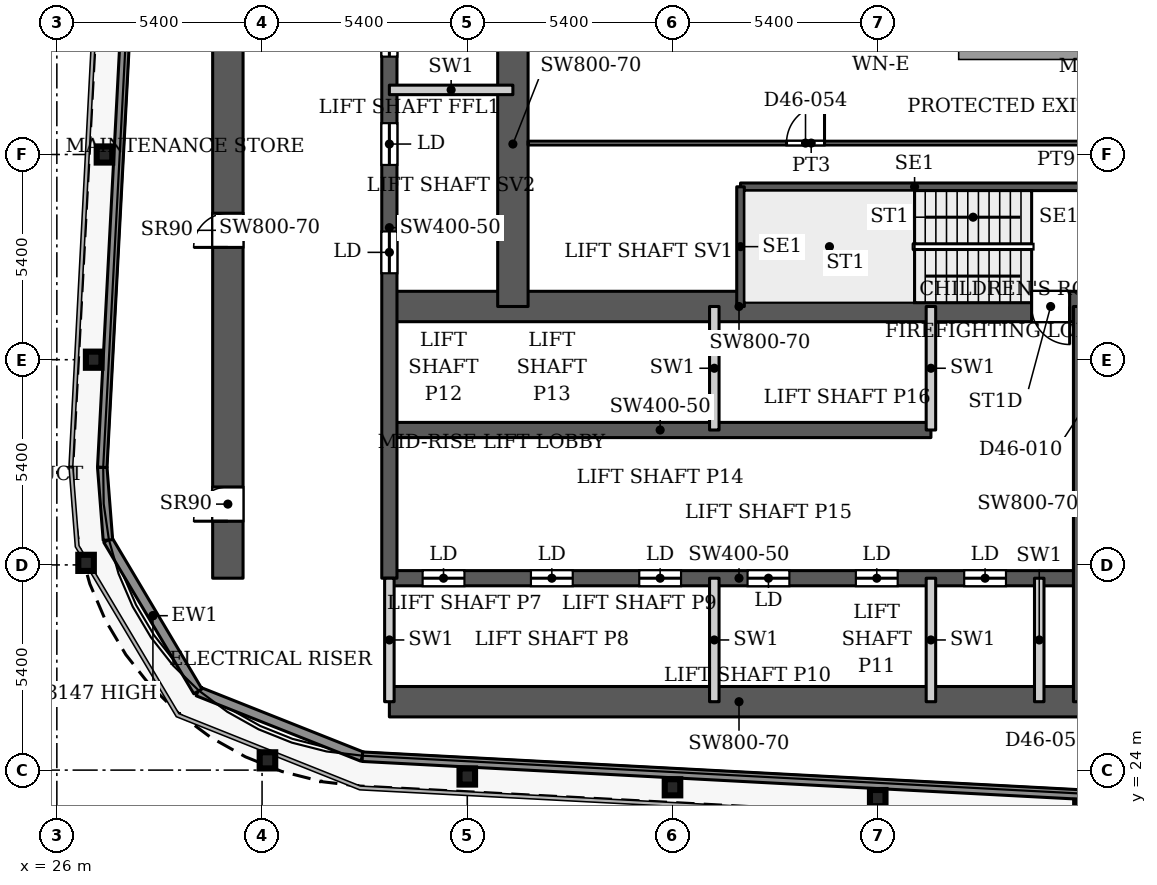
"""IFC4 building model, lengths in metres.
Left out: names, types, materials, properties, quantities, classifications, styles, units other than length and angle.
Written with IfcOpenShell. Run it as: python <this file> out.ifc"""

import sys

from ifc_helpers import new_model, si_unit, direction, frame, frame_2d, origin, origin_2d, place, context, subcontext, project, spatial, rectangle, i_section, extrude, source, transform, mapped, element, fill, save


model = new_model("IFC4")
c1 = context("Model", 3, precision=1e-05, world=origin(), true_north=direction((0.0, 1.0)))
c2 = subcontext(c1, "Body", "Model", "MODEL_VIEW")
j1 = project(units=[si_unit("LENGTHUNIT", "METRE"), si_unit("PLANEANGLEUNIT", "RADIAN")], contexts=[c1])
p1 = place(None, origin())
s1 = spatial("IfcSite", under=j1, at=p1, CompositionType="ELEMENT")
p2 = place(p1, origin())
s2 = spatial("IfcBuilding", under=s1, at=p2, CompositionType="ELEMENT")
p3 = place(p2, frame((0.0, 0.0, 195.5)))
s3 = spatial("IfcBuildingStorey", under=s2, at=p3, CompositionType="ELEMENT", Elevation=195.5)
for number, where, z_axis, x_axis in (
    (1, (53.0, 22.98, 0.0), (0.0, 0.0, 1.0), (1.0, 0.0, 0.0)),
    (2, (47.6, 23.264, 0.0), (0.0, 0.0, 1.0), (1.0, 0.0, 0.0)),
    (3, (42.2, 23.548, 0.0), (0.0, 0.0, 1.0), (1.0, 0.0, 0.0)),
    (4, (36.8, 23.832, 0.0), (0.0, 0.0, 1.0), (1.0, 0.0, 0.0)),
    (5, (31.542, 24.257, 0.0), (0.0, 0.0, 1.0), (1.0, 0.0, 0.0)),
    (6, (26.769, 29.454, 0.0), (0.0, 0.0, 1.0), (1.0, 0.0, 0.0)),
    (7, (26.969, 34.8, 0.0), (0.0, 0.0, 1.0), (1.0, 0.0, 0.0)),
    (8, (27.253, 40.2, 0.0), (0.0, 0.0, 1.0), (1.0, 0.0, 0.0)),
):
    element("IfcColumn", number, at=place(p3, frame(where, z_axis=z_axis, x_axis=x_axis)), inside=s3, PredefinedType="COLUMN", context=c2, shape_type="SweptSolid", body=[
        extrude(i_section(OverallWidth=0.409, OverallDepth=0.425, WebThickness=0.033, FlangeThickness=0.052, FilletRadius=0.013, at=origin_2d()), origin(), (0.0, 0.0, 1.0), 3.9),
    ])
p4 = place(p3, frame((34.75, 25.8, 0.0), z_axis=(0.0, 0.0, 1.0), x_axis=(1.0, 0.0, 0.0)))
e9 = element("IfcWall", 9, at=p4, inside=s3, PredefinedType="SHEAR", context=c2, shape_type="SweptSolid", body=[
    extrude(rectangle(XDim=18.4, YDim=0.8, at=frame_2d((9.2, 0.0))), origin(), (0.0, 0.0, 1.0), 3.9),
])
p5 = place(p3, frame((34.75, 29.05, 0.0), z_axis=(0.0, 0.0, 1.0), x_axis=(1.0, 0.0, 0.0)))
e10 = element("IfcWall", 10, at=p5, inside=s3, PredefinedType="SHEAR", context=c2, shape_type="SweptSolid", body=[
    extrude(rectangle(XDim=18.4, YDim=0.4, at=frame_2d((9.2, 0.0))), origin(), (0.0, 0.0, 1.0), 3.9),
])
p6 = place(p5, frame((0.875, 0.0, 0.0)))
e11 = element("IfcOpeningElement", 11, at=p6, cuts=e10, PredefinedType="OPENING", context=c2, shape_type="SweptSolid", body=[
    extrude(rectangle(XDim=1.1, YDim=2.2, at=frame_2d((0.55, 1.1))), frame((0.0, 0.21, 0.0), z_axis=(0.0, -1.0, 0.0), x_axis=(1.0, 0.0, 0.0)), (0.0, 0.0, 1.0), 0.42),
])
p7 = place(p5, frame((3.725, 0.0, 0.0)))
e12 = element("IfcOpeningElement", 12, at=p7, cuts=e10, PredefinedType="OPENING", context=c2, shape_type="SweptSolid", body=[
    extrude(rectangle(XDim=1.1, YDim=2.2, at=frame_2d((0.55, 1.1))), frame((0.0, 0.21, 0.0), z_axis=(0.0, -1.0, 0.0), x_axis=(1.0, 0.0, 0.0)), (0.0, 0.0, 1.0), 0.42),
])
p8 = place(p5, frame((6.575, 0.0, 0.0)))
e13 = element("IfcOpeningElement", 13, at=p8, cuts=e10, PredefinedType="OPENING", context=c2, shape_type="SweptSolid", body=[
    extrude(rectangle(XDim=1.1, YDim=2.2, at=frame_2d((0.55, 1.1))), frame((0.0, 0.21, 0.0), z_axis=(0.0, -1.0, 0.0), x_axis=(1.0, 0.0, 0.0)), (0.0, 0.0, 1.0), 0.42),
])
p9 = place(p5, frame((9.425, 0.0, 0.0)))
e14 = element("IfcOpeningElement", 14, at=p9, cuts=e10, PredefinedType="OPENING", context=c2, shape_type="SweptSolid", body=[
    extrude(rectangle(XDim=1.1, YDim=2.2, at=frame_2d((0.55, 1.1))), frame((0.0, 0.21, 0.0), z_axis=(0.0, -1.0, 0.0), x_axis=(1.0, 0.0, 0.0)), (0.0, 0.0, 1.0), 0.42),
])
p10 = place(p5, frame((12.275, 0.0, 0.0)))
e15 = element("IfcOpeningElement", 15, at=p10, cuts=e10, PredefinedType="OPENING", context=c2, shape_type="SweptSolid", body=[
    extrude(rectangle(XDim=1.1, YDim=2.2, at=frame_2d((0.55, 1.1))), frame((0.0, 0.21, 0.0), z_axis=(0.0, -1.0, 0.0), x_axis=(1.0, 0.0, 0.0)), (0.0, 0.0, 1.0), 0.42),
])
p11 = place(p5, frame((15.125, 0.0, 0.0)))
e16 = element("IfcOpeningElement", 16, at=p11, cuts=e10, PredefinedType="OPENING", context=c2, shape_type="SweptSolid", body=[
    extrude(rectangle(XDim=1.1, YDim=2.2, at=frame_2d((0.55, 1.1))), frame((0.0, 0.21, 0.0), z_axis=(0.0, -1.0, 0.0), x_axis=(1.0, 0.0, 0.0)), (0.0, 0.0, 1.0), 0.42),
])
p12 = place(p3, frame((34.75, 32.95, 0.0), z_axis=(0.0, 0.0, 1.0), x_axis=(1.0, 0.0, 0.0)))
e17 = element("IfcWall", 17, at=p12, inside=s3, PredefinedType="SHEAR", context=c2, shape_type="SweptSolid", body=[
    extrude(rectangle(XDim=14.25, YDim=0.4, at=frame_2d((7.125, 0.0))), origin(), (0.0, 0.0, 1.0), 3.9),
])
p13 = place(p3, frame((34.75, 36.2, 0.0), z_axis=(0.0, 0.0, 1.0), x_axis=(1.0, 0.0, 0.0)))
e18 = element("IfcWall", 18, at=p13, inside=s3, PredefinedType="SHEAR", context=c2, shape_type="SweptSolid", body=[
    extrude(rectangle(XDim=18.4, YDim=0.8, at=frame_2d((9.2, 0.0))), origin(), (0.0, 0.0, 1.0), 3.9),
])
p14 = place(p13, frame((16.9, 0.0, 0.0)))
e19 = element("IfcOpeningElement", 19, at=p14, cuts=e18, PredefinedType="OPENING", context=c2, shape_type="SweptSolid", body=[
    extrude(rectangle(XDim=1.0, YDim=2.2, at=frame_2d((0.5, 1.1))), frame((0.0, 0.41, 0.0), z_axis=(0.0, -1.0, 0.0), x_axis=(1.0, 0.0, 0.0)), (0.0, 0.0, 1.0), 0.82),
])
p15 = place(p3, frame((34.75, 29.05, 0.0), z_axis=(0.0, 0.0, 1.0), x_axis=(0.0, 1.0, 0.0)))
e20 = element("IfcWall", 20, at=p15, inside=s3, PredefinedType="SHEAR", context=c2, shape_type="SweptSolid", body=[
    extrude(rectangle(XDim=18.45, YDim=0.4, at=frame_2d((9.225, 0.0))), origin(), (0.0, 0.0, 1.0), 3.9),
])
p16 = place(p15, frame((8.025, 0.0, 0.0)))
e21 = element("IfcOpeningElement", 21, at=p16, cuts=e20, PredefinedType="OPENING", context=c2, shape_type="SweptSolid", body=[
    extrude(rectangle(XDim=1.1, YDim=2.2, at=frame_2d((0.55, 1.1))), frame((0.0, 0.21, 0.0), z_axis=(0.0, -1.0, 0.0), x_axis=(1.0, 0.0, 0.0)), (0.0, 0.0, 1.0), 0.42),
])
p17 = place(p15, frame((10.875, 0.0, 0.0)))
e22 = element("IfcOpeningElement", 22, at=p17, cuts=e20, PredefinedType="OPENING", context=c2, shape_type="SweptSolid", body=[
    extrude(rectangle(XDim=1.1, YDim=2.2, at=frame_2d((0.55, 1.1))), frame((0.0, 0.21, 0.0), z_axis=(0.0, -1.0, 0.0), x_axis=(1.0, 0.0, 0.0)), (0.0, 0.0, 1.0), 0.42),
])
p18 = place(p15, frame((13.725, 0.0, 0.0)))
e23 = element("IfcOpeningElement", 23, at=p18, cuts=e20, PredefinedType="OPENING", context=c2, shape_type="SweptSolid", body=[
    extrude(rectangle(XDim=1.1, YDim=2.2, at=frame_2d((0.55, 1.1))), frame((0.0, 0.21, 0.0), z_axis=(0.0, -1.0, 0.0), x_axis=(1.0, 0.0, 0.0)), (0.0, 0.0, 1.0), 0.42),
])
p19 = place(p15, frame((15.95, 0.0, 0.0)))
e24 = element("IfcOpeningElement", 24, at=p19, cuts=e20, PredefinedType="OPENING", context=c2, shape_type="SweptSolid", body=[
    extrude(rectangle(XDim=1.1, YDim=2.2, at=frame_2d((0.55, 1.1))), frame((0.0, 0.21, 0.0), z_axis=(0.0, -1.0, 0.0), x_axis=(1.0, 0.0, 0.0)), (0.0, 0.0, 1.0), 0.42),
])
p20 = place(p3, frame((38.0, 36.2, 0.0), z_axis=(0.0, 0.0, 1.0), x_axis=(0.0, 1.0, 0.0)))
e25 = element("IfcWall", 25, at=p20, inside=s3, PredefinedType="SHEAR", context=c2, shape_type="SweptSolid", body=[
    extrude(rectangle(XDim=8.55, YDim=0.8, at=frame_2d((4.275, 0.0))), origin(), (0.0, 0.0, 1.0), 3.9),
])
p21 = place(p3, frame((30.5, 29.05, 0.0), z_axis=(0.0, 0.0, 1.0), x_axis=(0.0, 1.0, 0.0)))
e26 = element("IfcWall", 26, at=p21, inside=s3, PredefinedType="SHEAR", context=c2, shape_type="SweptSolid", body=[
    extrude(rectangle(XDim=18.45, YDim=0.8, at=frame_2d((9.225, 0.0))), origin(), (0.0, 0.0, 1.0), 3.9),
])
p22 = place(p21, frame((1.5, 0.0, 0.0)))
e27 = element("IfcOpeningElement", 27, at=p22, cuts=e26, PredefinedType="OPENING", context=c2, shape_type="SweptSolid", body=[
    extrude(rectangle(XDim=0.9, YDim=2.2, at=frame_2d((0.45, 1.1))), frame((0.0, 0.41, 0.0), z_axis=(0.0, -1.0, 0.0), x_axis=(1.0, 0.0, 0.0)), (0.0, 0.0, 1.0), 0.82),
])
p23 = place(p21, frame((8.705, 0.0, 0.0)))
e28 = element("IfcOpeningElement", 28, at=p23, cuts=e26, PredefinedType="OPENING", context=c2, shape_type="SweptSolid", body=[
    extrude(rectangle(XDim=0.9, YDim=2.2, at=frame_2d((0.45, 1.1))), frame((0.0, 0.41, 0.0), z_axis=(0.0, -1.0, 0.0), x_axis=(1.0, 0.0, 0.0)), (0.0, 0.0, 1.0), 0.82),
])
p24 = place(p3, frame((53.15, 25.8, 0.0), z_axis=(0.0, 0.0, 1.0), x_axis=(0.0, 1.0, 0.0)))
e29 = element("IfcWall", 29, at=p24, inside=s3, PredefinedType="SHEAR", context=c2, shape_type="SweptSolid", body=[
    extrude(rectangle(XDim=10.4, YDim=0.8, at=frame_2d((5.2, 0.0))), origin(), (0.0, 0.0, 1.0), 3.9),
])
p25 = place(p3, frame((34.039, 24.353, 0.0), z_axis=(0.0, 0.0, 1.0), x_axis=(-0.929352825399, 0.369192803184, 0.0)))
e30 = element("IfcWall", 30, at=p25, inside=s3, PredefinedType="SOLIDWALL", context=c2, shape_type="SweptSolid", body=[
    extrude(rectangle(XDim=4.656, YDim=0.25, at=frame_2d((2.328, 0.0))), origin(), (0.0, 0.0, 1.0), 3.75),
])
p26 = place(p3, frame((29.712, 26.072, 0.0), z_axis=(0.0, 0.0, 1.0), x_axis=(-0.511028049012, 0.859564036662, 0.0)))
e31 = element("IfcWall", 31, at=p26, inside=s3, PredefinedType="SOLIDWALL", context=c2, shape_type="SweptSolid", body=[
    extrude(rectangle(XDim=4.634, YDim=0.25, at=frame_2d((2.317, 0.0))), origin(), (0.0, 0.0, 1.0), 3.147),
])
p27 = place(p3, frame((27.344, 30.055, 0.0), z_axis=(0.0, 0.0, 1.0), x_axis=(-0.077571675317, 0.99698677784, 0.0)))
e32 = element("IfcWall", 32, at=p27, inside=s3, PredefinedType="SOLIDWALL", context=c2, shape_type="SweptSolid", body=[
    extrude(rectangle(XDim=1.92, YDim=0.25, at=frame_2d((0.96, 0.0))), origin(), (0.0, 0.0, 1.0), 3.75),
])
p28 = place(p3, frame((27.195, 31.969, 0.0), z_axis=(0.0, 0.0, 1.0), x_axis=(0.052554995867, 0.998618031286, 0.0)))
e33 = element("IfcWall", 33, at=p28, inside=s3, PredefinedType="SOLIDWALL", context=c2, shape_type="SweptSolid", body=[
    extrude(rectangle(XDim=66.787, YDim=0.25, at=frame_2d((33.394, 0.0))), origin(), (0.0, 0.0, 1.0), 3.75),
])
p29 = place(p3, frame((100.586, 20.85, 0.0), z_axis=(0.0, 0.0, 1.0), x_axis=(-0.99861746497, 0.052565755559, 0.0)))
e34 = element("IfcWall", 34, at=p29, inside=s3, PredefinedType="SOLIDWALL", context=c2, shape_type="SweptSolid", body=[
    extrude(rectangle(XDim=66.639, YDim=0.25, at=frame_2d((33.319, 0.0))), origin(), (0.0, 0.0, 1.0), 3.75),
])
p30 = place(p3, frame((43.99, 39.35, 0.0), z_axis=(0.0, 0.0, 1.0), x_axis=(1.0, 0.0, 0.0)))
e35 = element("IfcWall", 35, at=p30, inside=s3, PredefinedType="SHEAR", context=c2, shape_type="SweptSolid", body=[
    extrude(rectangle(XDim=9.16, YDim=0.2, at=frame_2d((4.58, 0.0))), origin(), (0.0, 0.0, 1.0), 3.9),
])
p31 = place(p3, frame((43.99, 36.2, 0.0), z_axis=(0.0, 0.0, 1.0), x_axis=(0.0, 1.0, 0.0)))
e36 = element("IfcWall", 36, at=p31, inside=s3, PredefinedType="SHEAR", context=c2, shape_type="SweptSolid", body=[
    extrude(rectangle(XDim=3.15, YDim=0.2, at=frame_2d((1.575, 0.0))), origin(), (0.0, 0.0, 1.0), 3.9),
])
for number, where, z_axis, x_axis in (
    (37, (34.75, 25.8, 0.0), (0.0, 0.0, 1.0), (0.0, 1.0, 0.0)),
    (38, (43.3, 25.8, 0.0), (0.0, 0.0, 1.0), (0.0, 1.0, 0.0)),
    (39, (43.3, 32.95, 0.0), (0.0, 0.0, 1.0), (0.0, 1.0, 0.0)),
    (40, (49.0, 25.8, 0.0), (0.0, 0.0, 1.0), (0.0, 1.0, 0.0)),
    (41, (49.0, 32.95, 0.0), (0.0, 0.0, 1.0), (0.0, 1.0, 0.0)),
    (42, (51.85, 25.8, 0.0), (0.0, 0.0, 1.0), (0.0, 1.0, 0.0)),
    (43, (34.75, 41.9, 0.0), (0.0, 0.0, 1.0), (1.0, 0.0, 0.0)),
):
    element("IfcWall", number, at=place(p3, frame(where, z_axis=z_axis, x_axis=x_axis)), inside=s3, PredefinedType="PARTITIONING", context=c2, shape_type="SweptSolid", body=[
        extrude(rectangle(XDim=3.25, YDim=0.25, at=frame_2d((1.625, 0.0))), origin(), (0.0, 0.0, 1.0), 3.9),
    ])
p32 = place(p3, frame((38.399, 40.5, 0.0), z_axis=(0.0, 0.0, 1.0), x_axis=(1.0, 0.0, 0.0)))
e44 = element("IfcWall", 44, at=p32, inside=s3, PredefinedType="PARTITIONING", context=c2, shape_type="SweptSolid", body=[
    extrude(rectangle(XDim=14.901, YDim=0.1, at=frame_2d((7.451, 0.0))), origin(), (0.0, 0.0, 1.0), 3.6),
])
p33 = place(p32, frame((6.801, 0.0, 0.0)))
e45 = element("IfcOpeningElement", 45, at=p33, cuts=e44, PredefinedType="OPENING", context=c2, shape_type="SweptSolid", body=[
    extrude(rectangle(XDim=1.0, YDim=2.1, at=frame_2d((0.5, 1.05))), frame((0.0, 0.06, 0.0), z_axis=(0.0, -1.0, 0.0), x_axis=(1.0, 0.0, 0.0)), (0.0, 0.0, 1.0), 0.12),
])
m1 = source(origin(), c2, "Body", "SweptSolid", [
    extrude(rectangle(XDim=1.1, YDim=2.2, at=frame_2d((0.55, 1.1))), frame((0.0, 0.025, 0.0), z_axis=(0.0, -1.0, 0.0), x_axis=(1.0, 0.0, 0.0)), (0.0, 0.0, 1.0), 0.05),
])
p34 = place(p6, origin())
e46 = element("IfcDoor", 46, at=p34, inside=s3, OperationType="SLIDING_TO_LEFT", PredefinedType="DOOR", context=c2, shape_type="MappedRepresentation", body=[
    mapped(m1, transform((0.0, 0.0, 0.0), x_axis=(1.0, 0.0, 0.0), y_axis=(0.0, 1.0, 0.0), z_axis=(0.0, 0.0, 1.0), scale=1.0)),
])
fill(e11, e46)
p35 = place(p7, origin())
e47 = element("IfcDoor", 47, at=p35, inside=s3, OperationType="SLIDING_TO_LEFT", PredefinedType="DOOR", context=c2, shape_type="MappedRepresentation", body=[
    mapped(m1, transform((0.0, 0.0, 0.0), x_axis=(1.0, 0.0, 0.0), y_axis=(0.0, 1.0, 0.0), z_axis=(0.0, 0.0, 1.0), scale=1.0)),
])
fill(e12, e47)
p36 = place(p8, origin())
e48 = element("IfcDoor", 48, at=p36, inside=s3, OperationType="SLIDING_TO_LEFT", PredefinedType="DOOR", context=c2, shape_type="MappedRepresentation", body=[
    mapped(m1, transform((0.0, 0.0, 0.0), x_axis=(1.0, 0.0, 0.0), y_axis=(0.0, 1.0, 0.0), z_axis=(0.0, 0.0, 1.0), scale=1.0)),
])
fill(e13, e48)
p37 = place(p9, origin())
e49 = element("IfcDoor", 49, at=p37, inside=s3, OperationType="SLIDING_TO_LEFT", PredefinedType="DOOR", context=c2, shape_type="MappedRepresentation", body=[
    mapped(m1, transform((0.0, 0.0, 0.0), x_axis=(1.0, 0.0, 0.0), y_axis=(0.0, 1.0, 0.0), z_axis=(0.0, 0.0, 1.0), scale=1.0)),
])
fill(e14, e49)
p38 = place(p10, origin())
e50 = element("IfcDoor", 50, at=p38, inside=s3, OperationType="SLIDING_TO_LEFT", PredefinedType="DOOR", context=c2, shape_type="MappedRepresentation", body=[
    mapped(m1, transform((0.0, 0.0, 0.0), x_axis=(1.0, 0.0, 0.0), y_axis=(0.0, 1.0, 0.0), z_axis=(0.0, 0.0, 1.0), scale=1.0)),
])
fill(e15, e50)
p39 = place(p16, origin())
e51 = element("IfcDoor", 51, at=p39, inside=s3, OperationType="SLIDING_TO_LEFT", PredefinedType="DOOR", context=c2, shape_type="MappedRepresentation", body=[
    mapped(m1, transform((0.0, 0.0, 0.0), x_axis=(1.0, 0.0, 0.0), y_axis=(0.0, 1.0, 0.0), z_axis=(0.0, 0.0, 1.0), scale=1.0)),
])
fill(e21, e51)
p40 = place(p17, origin())
e52 = element("IfcDoor", 52, at=p40, inside=s3, OperationType="SLIDING_TO_LEFT", PredefinedType="DOOR", context=c2, shape_type="MappedRepresentation", body=[
    mapped(m1, transform((0.0, 0.0, 0.0), x_axis=(1.0, 0.0, 0.0), y_axis=(0.0, 1.0, 0.0), z_axis=(0.0, 0.0, 1.0), scale=1.0)),
])
fill(e22, e52)
p41 = place(p18, origin())
e53 = element("IfcDoor", 53, at=p41, inside=s3, OperationType="SLIDING_TO_LEFT", PredefinedType="DOOR", context=c2, shape_type="MappedRepresentation", body=[
    mapped(m1, transform((0.0, 0.0, 0.0), x_axis=(1.0, 0.0, 0.0), y_axis=(0.0, 1.0, 0.0), z_axis=(0.0, 0.0, 1.0), scale=1.0)),
])
fill(e23, e53)
p42 = place(p11, origin())
e54 = element("IfcDoor", 54, at=p42, inside=s3, OperationType="SLIDING_TO_LEFT", PredefinedType="DOOR", context=c2, shape_type="MappedRepresentation", body=[
    mapped(m1, transform((0.0, 0.0, 0.0), x_axis=(1.0, 0.0, 0.0), y_axis=(0.0, 1.0, 0.0), z_axis=(0.0, 0.0, 1.0), scale=1.0)),
])
fill(e16, e54)
m2 = source(origin(), c2, "Body", "SweptSolid", [
    extrude(rectangle(XDim=0.9, YDim=2.2, at=frame_2d((0.45, 1.1))), frame((0.0, 0.025, 0.0), z_axis=(0.0, -1.0, 0.0), x_axis=(1.0, 0.0, 0.0)), (0.0, 0.0, 1.0), 0.05),
])
p43 = place(p22, origin())
e55 = element("IfcDoor", 55, at=p43, inside=s3, OperationType="SINGLE_SWING_LEFT", PredefinedType="DOOR", context=c2, shape_type="MappedRepresentation", body=[
    mapped(m2, transform((0.0, 0.0, 0.0), x_axis=(1.0, 0.0, 0.0), y_axis=(0.0, 1.0, 0.0), z_axis=(0.0, 0.0, 1.0), scale=1.0)),
])
fill(e27, e55)
p44 = place(p23, origin())
e56 = element("IfcDoor", 56, at=p44, inside=s3, OperationType="SINGLE_SWING_LEFT", PredefinedType="DOOR", context=c2, shape_type="MappedRepresentation", body=[
    mapped(m2, transform((0.0, 0.0, 0.0), x_axis=(1.0, 0.0, 0.0), y_axis=(0.0, 1.0, 0.0), z_axis=(0.0, 0.0, 1.0), scale=1.0)),
])
fill(e28, e56)
m3 = source(origin(), c2, "Body", "SweptSolid", [
    extrude(rectangle(XDim=1.0, YDim=2.2, at=frame_2d((0.5, 1.1))), frame((0.0, 0.025, 0.0), z_axis=(0.0, -1.0, 0.0), x_axis=(1.0, 0.0, 0.0)), (0.0, 0.0, 1.0), 0.05),
])
p45 = place(p14, origin())
e57 = element("IfcDoor", 57, at=p45, inside=s3, OperationType="SINGLE_SWING_RIGHT", PredefinedType="DOOR", context=c2, shape_type="MappedRepresentation", body=[
    mapped(m3, transform((0.0, 0.0, 0.0), x_axis=(1.0, 0.0, 0.0), y_axis=(0.0, 1.0, 0.0), z_axis=(0.0, 0.0, 1.0), scale=1.0)),
])
fill(e19, e57)
m4 = source(origin(), c2, "Body", "SweptSolid", [
    extrude(rectangle(XDim=1.0, YDim=2.1, at=frame_2d((0.5, 1.05))), frame((0.0, 0.025, 0.0), z_axis=(0.0, -1.0, 0.0), x_axis=(1.0, 0.0, 0.0)), (0.0, 0.0, 1.0), 0.05),
])
p46 = place(p33, origin())
e58 = element("IfcDoor", 58, at=p46, inside=s3, OperationType="SINGLE_SWING_LEFT", PredefinedType="DOOR", context=c2, shape_type="MappedRepresentation", body=[
    mapped(m4, transform((0.0, 0.0, 0.0), x_axis=(1.0, 0.0, 0.0), y_axis=(0.0, 1.0, 0.0), z_axis=(0.0, 0.0, 1.0), scale=1.0)),
])
fill(e45, e58)
save(model, sys.argv[1])
